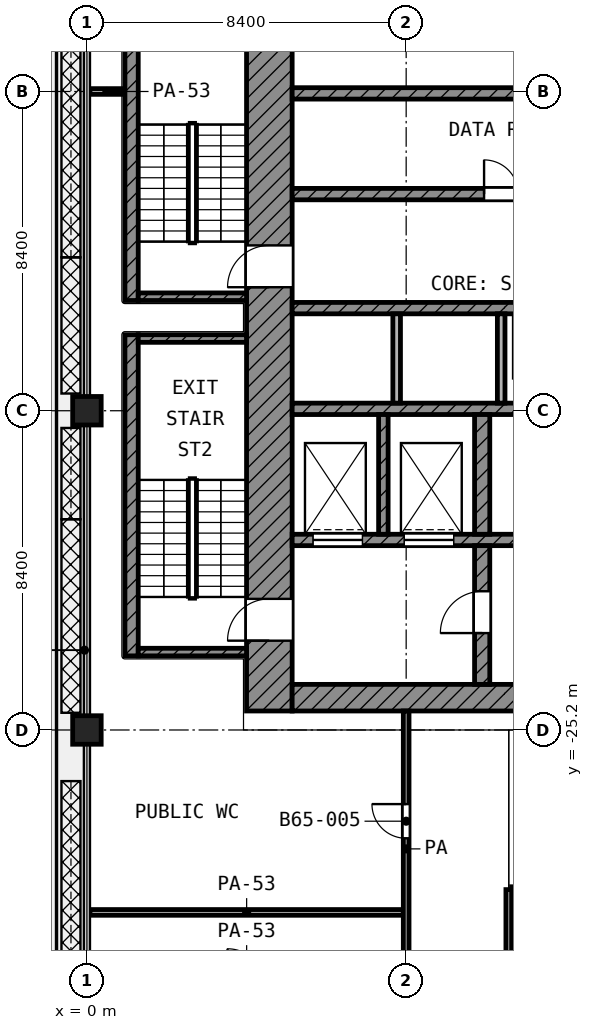
"""IFC4 building model, lengths in metres.
Left out: names, types, materials, properties, quantities, classifications, styles, units other than length and angle.
Written with IfcOpenShell. Run it as: python <this file> out.ifc"""

import sys

from ifc_helpers import new_model, si_unit, direction, frame, frame_2d, origin, origin_2d, place, context, subcontext, project, spatial, rectangle, extrude, element, fill, save


model = new_model("IFC4")
c1 = context("Model", 3, precision=1e-05, world=origin(), true_north=direction((0.0, 1.0)))
c2 = subcontext(c1, "Body", "Model", "MODEL_VIEW")
j1 = project(units=[si_unit("LENGTHUNIT", "METRE"), si_unit("PLANEANGLEUNIT", "RADIAN")], contexts=[c1])
p1 = place(None, origin())
s1 = spatial("IfcSite", under=j1, at=p1, CompositionType="ELEMENT")
p2 = place(p1, origin())
s2 = spatial("IfcBuilding", under=s1, at=p2, CompositionType="ELEMENT")
p3 = place(p2, frame((0.0, 0.0, 281.8)))
s3 = spatial("IfcBuildingStorey", under=s2, at=p3, CompositionType="ELEMENT", Elevation=281.8)
for number, where, z_axis, x_axis in (
    (1, (0.0, -16.8, 0.0), (0.0, 0.0, 1.0), (1.0, 0.0, 0.0)),
    (2, (0.0, -25.2, 0.0), (0.0, 0.0, 1.0), (1.0, 0.0, 0.0)),
):
    element("IfcColumn", number, at=place(p3, frame(where, z_axis=z_axis, x_axis=x_axis)), inside=s3, PredefinedType="COLUMN", context=c2, shape_type="SweptSolid", body=[
        extrude(rectangle(XDim=0.75, YDim=0.75, at=origin_2d()), origin(), (0.0, 0.0, 1.0), 4.2),
    ])
p4 = place(p3, frame((4.8, -24.7, 0.0), z_axis=(0.0, 0.0, 1.0), x_axis=(0.0, 1.0, 0.0)))
e3 = element("IfcWall", 3, at=p4, inside=s3, PredefinedType="SHEAR", context=c2, shape_type="SweptSolid", body=[
    extrude(rectangle(XDim=19.3, YDim=1.2, at=frame_2d((9.65, 0.0))), origin(), (0.0, 0.0, 1.0), 3.6),
])
p5 = place(p4, frame((11.15, 0.0, 0.0)))
e4 = element("IfcOpeningElement", 4, at=p5, cuts=e3, PredefinedType="OPENING", context=c2, shape_type="SweptSolid", body=[
    extrude(rectangle(XDim=1.1, YDim=2.1, at=frame_2d((0.55, 1.05))), frame((0.0, 0.61, 0.0), z_axis=(0.0, -1.0, 0.0), x_axis=(1.0, 0.0, 0.0)), (0.0, 0.0, 1.0), 1.22),
])
p6 = place(p4, frame((1.85, 0.0, 0.0)))
e5 = element("IfcOpeningElement", 5, at=p6, cuts=e3, PredefinedType="OPENING", context=c2, shape_type="SweptSolid", body=[
    extrude(rectangle(XDim=1.1, YDim=2.1, at=frame_2d((0.55, 1.05))), frame((0.0, 0.61, 0.0), z_axis=(0.0, -1.0, 0.0), x_axis=(1.0, 0.0, 0.0)), (0.0, 0.0, 1.0), 1.22),
])
p7 = place(p3, frame((5.4, -24.35, 0.0), z_axis=(0.0, 0.0, 1.0), x_axis=(1.0, 0.0, 0.0)))
e6 = element("IfcWall", 6, at=p7, inside=s3, PredefinedType="SHEAR", context=c2, shape_type="SweptSolid", body=[
    extrude(rectangle(XDim=18.6, YDim=0.7, at=frame_2d((9.3, 0.0))), origin(), (0.0, 0.0, 1.0), 3.6),
])
p8 = place(p7, frame((6.3, 0.0, 0.0)))
e7 = element("IfcOpeningElement", 7, at=p8, cuts=e6, PredefinedType="OPENING", context=c2, shape_type="SweptSolid", body=[
    extrude(rectangle(XDim=1.8, YDim=2.1, at=frame_2d((0.9, 1.05))), frame((0.0, 0.36, 0.0), z_axis=(0.0, -1.0, 0.0), x_axis=(1.0, 0.0, 0.0)), (0.0, 0.0, 1.0), 0.72),
])
p9 = place(p3, frame((5.4, -8.45, 0.0), z_axis=(0.0, 0.0, 1.0), x_axis=(1.0, 0.0, 0.0)))
e8 = element("IfcWall", 8, at=p9, inside=s3, PredefinedType="SHEAR", context=c2, shape_type="SweptSolid", body=[
    extrude(rectangle(XDim=16.65, YDim=0.3, at=frame_2d((8.325, 0.0))), origin(), (0.0, 0.0, 1.0), 3.6),
])
p10 = place(p3, frame((5.4, -11.1, 0.0), z_axis=(0.0, 0.0, 1.0), x_axis=(1.0, 0.0, 0.0)))
e9 = element("IfcWall", 9, at=p10, inside=s3, PredefinedType="SHEAR", context=c2, shape_type="SweptSolid", body=[
    extrude(rectangle(XDim=16.65, YDim=0.3, at=frame_2d((8.325, 0.0))), origin(), (0.0, 0.0, 1.0), 3.6),
])
p11 = place(p10, frame((5.05, 0.0, 0.0)))
e10 = element("IfcOpeningElement", 10, at=p11, cuts=e9, PredefinedType="OPENING", context=c2, shape_type="SweptSolid", body=[
    extrude(rectangle(XDim=0.9, YDim=2.1, at=frame_2d((0.45, 1.05))), frame((0.0, 0.16, 0.0), z_axis=(0.0, -1.0, 0.0), x_axis=(1.0, 0.0, 0.0)), (0.0, 0.0, 1.0), 0.32),
])
p12 = place(p3, frame((5.4, -14.1, 0.0), z_axis=(0.0, 0.0, 1.0), x_axis=(1.0, 0.0, 0.0)))
e11 = element("IfcWall", 11, at=p12, inside=s3, PredefinedType="SHEAR", context=c2, shape_type="SweptSolid", body=[
    extrude(rectangle(XDim=16.65, YDim=0.3, at=frame_2d((8.325, 0.0))), origin(), (0.0, 0.0, 1.0), 3.6),
])
p13 = place(p12, frame((6.325, 0.0, 0.0)))
e12 = element("IfcOpeningElement", 12, at=p13, cuts=e11, PredefinedType="OPENING", context=c2, shape_type="SweptSolid", body=[
    extrude(rectangle(XDim=1.1, YDim=2.1, at=frame_2d((0.55, 1.05))), frame((0.0, 0.16, 0.0), z_axis=(0.0, -1.0, 0.0), x_axis=(1.0, 0.0, 0.0)), (0.0, 0.0, 1.0), 0.32),
])
p14 = place(p12, frame((9.075, 0.0, 0.0)))
e13 = element("IfcOpeningElement", 13, at=p14, cuts=e11, PredefinedType="OPENING", context=c2, shape_type="SweptSolid", body=[
    extrude(rectangle(XDim=1.1, YDim=2.1, at=frame_2d((0.55, 1.05))), frame((0.0, 0.16, 0.0), z_axis=(0.0, -1.0, 0.0), x_axis=(1.0, 0.0, 0.0)), (0.0, 0.0, 1.0), 0.32),
])
p15 = place(p12, frame((11.825, 0.0, 0.0)))
e14 = element("IfcOpeningElement", 14, at=p15, cuts=e11, PredefinedType="OPENING", context=c2, shape_type="SweptSolid", body=[
    extrude(rectangle(XDim=1.1, YDim=2.1, at=frame_2d((0.55, 1.05))), frame((0.0, 0.16, 0.0), z_axis=(0.0, -1.0, 0.0), x_axis=(1.0, 0.0, 0.0)), (0.0, 0.0, 1.0), 0.32),
])
p16 = place(p12, frame((14.575, 0.0, 0.0)))
e15 = element("IfcOpeningElement", 15, at=p16, cuts=e11, PredefinedType="OPENING", context=c2, shape_type="SweptSolid", body=[
    extrude(rectangle(XDim=1.1, YDim=2.1, at=frame_2d((0.55, 1.05))), frame((0.0, 0.16, 0.0), z_axis=(0.0, -1.0, 0.0), x_axis=(1.0, 0.0, 0.0)), (0.0, 0.0, 1.0), 0.32),
])
p17 = place(p3, frame((5.4, -16.75, 0.0), z_axis=(0.0, 0.0, 1.0), x_axis=(1.0, 0.0, 0.0)))
e16 = element("IfcWall", 16, at=p17, inside=s3, PredefinedType="SHEAR", context=c2, shape_type="SweptSolid", body=[
    extrude(rectangle(XDim=16.65, YDim=0.3, at=frame_2d((8.325, 0.0))), origin(), (0.0, 0.0, 1.0), 3.6),
])
p18 = place(p3, frame((5.4, -20.2, 0.0), z_axis=(0.0, 0.0, 1.0), x_axis=(1.0, 0.0, 0.0)))
e17 = element("IfcWall", 17, at=p18, inside=s3, PredefinedType="SHEAR", context=c2, shape_type="SweptSolid", body=[
    extrude(rectangle(XDim=14.65, YDim=0.3, at=frame_2d((7.325, 0.0))), origin(), (0.0, 0.0, 1.0), 3.6),
])
p19 = place(p18, frame((10.55, 0.0, 0.0)))
e18 = element("IfcOpeningElement", 18, at=p19, cuts=e17, PredefinedType="OPENING", context=c2, shape_type="SweptSolid", body=[
    extrude(rectangle(XDim=1.3, YDim=2.1, at=frame_2d((0.65, 1.05))), frame((0.0, 0.16, 0.0), z_axis=(0.0, -1.0, 0.0), x_axis=(1.0, 0.0, 0.0)), (0.0, 0.0, 1.0), 0.32),
])
p20 = place(p18, frame((12.95, 0.0, 0.0)))
e19 = element("IfcOpeningElement", 19, at=p20, cuts=e17, PredefinedType="OPENING", context=c2, shape_type="SweptSolid", body=[
    extrude(rectangle(XDim=1.3, YDim=2.1, at=frame_2d((0.65, 1.05))), frame((0.0, 0.16, 0.0), z_axis=(0.0, -1.0, 0.0), x_axis=(1.0, 0.0, 0.0)), (0.0, 0.0, 1.0), 0.32),
])
p21 = place(p18, frame((0.55, 0.0, 0.0)))
e20 = element("IfcOpeningElement", 20, at=p21, cuts=e17, PredefinedType="OPENING", context=c2, shape_type="SweptSolid", body=[
    extrude(rectangle(XDim=1.3, YDim=2.1, at=frame_2d((0.65, 1.05))), frame((0.0, 0.16, 0.0), z_axis=(0.0, -1.0, 0.0), x_axis=(1.0, 0.0, 0.0)), (0.0, 0.0, 1.0), 0.32),
])
p22 = place(p18, frame((2.95, 0.0, 0.0)))
e21 = element("IfcOpeningElement", 21, at=p22, cuts=e17, PredefinedType="OPENING", context=c2, shape_type="SweptSolid", body=[
    extrude(rectangle(XDim=1.3, YDim=2.1, at=frame_2d((0.65, 1.05))), frame((0.0, 0.16, 0.0), z_axis=(0.0, -1.0, 0.0), x_axis=(1.0, 0.0, 0.0)), (0.0, 0.0, 1.0), 0.32),
])
p23 = place(p18, frame((5.95, 0.0, 0.0)))
e22 = element("IfcOpeningElement", 22, at=p23, cuts=e17, PredefinedType="OPENING", context=c2, shape_type="SweptSolid", body=[
    extrude(rectangle(XDim=0.9, YDim=2.1, at=frame_2d((0.45, 1.05))), frame((0.0, 0.16, 0.0), z_axis=(0.0, -1.0, 0.0), x_axis=(1.0, 0.0, 0.0)), (0.0, 0.0, 1.0), 0.32),
])
p24 = place(p18, frame((8.35, 0.0, 0.0)))
e23 = element("IfcOpeningElement", 23, at=p24, cuts=e17, PredefinedType="OPENING", context=c2, shape_type="SweptSolid", body=[
    extrude(rectangle(XDim=0.9, YDim=2.1, at=frame_2d((0.45, 1.05))), frame((0.0, 0.16, 0.0), z_axis=(0.0, -1.0, 0.0), x_axis=(1.0, 0.0, 0.0)), (0.0, 0.0, 1.0), 0.32),
])
p25 = place(p3, frame((10.4, -24.0, 0.0), z_axis=(0.0, 0.0, 1.0), x_axis=(0.0, 1.0, 0.0)))
e24 = element("IfcWall", 24, at=p25, inside=s3, PredefinedType="SHEAR", context=c2, shape_type="SweptSolid", body=[
    extrude(rectangle(XDim=3.65, YDim=0.4, at=frame_2d((1.825, 0.0))), origin(), (0.0, 0.0, 1.0), 3.6),
])
p26 = place(p25, frame((1.35, 0.0, 0.0)))
e25 = element("IfcOpeningElement", 25, at=p26, cuts=e24, PredefinedType="OPENING", context=c2, shape_type="SweptSolid", body=[
    extrude(rectangle(XDim=1.1, YDim=2.1, at=frame_2d((0.55, 1.05))), frame((0.0, 0.21, 0.0), z_axis=(0.0, -1.0, 0.0), x_axis=(1.0, 0.0, 0.0)), (0.0, 0.0, 1.0), 0.42),
])
p27 = place(p3, frame((10.4, -20.05, 0.0), z_axis=(0.0, 0.0, 1.0), x_axis=(0.0, 1.0, 0.0)))
e26 = element("IfcWall", 26, at=p27, inside=s3, PredefinedType="SHEAR", context=c2, shape_type="SweptSolid", body=[
    extrude(rectangle(XDim=3.15, YDim=0.4, at=frame_2d((1.575, 0.0))), origin(), (0.0, 0.0, 1.0), 3.6),
])
p28 = place(p3, frame((7.8, -20.05, 0.0), z_axis=(0.0, 0.0, 1.0), x_axis=(0.0, 1.0, 0.0)))
e27 = element("IfcWall", 27, at=p28, inside=s3, PredefinedType="SHEAR", context=c2, shape_type="SweptSolid", body=[
    extrude(rectangle(XDim=3.15, YDim=0.25, at=frame_2d((1.575, 0.0))), origin(), (0.0, 0.0, 1.0), 3.6),
])
for number, where, z_axis, x_axis in (
    (28, (8.15, -16.6, 0.0), (0.0, 0.0, 1.0), (0.0, 1.0, 0.0)),
    (29, (10.9, -16.6, 0.0), (0.0, 0.0, 1.0), (0.0, 1.0, 0.0)),
):
    element("IfcWall", number, at=place(p3, frame(where, z_axis=z_axis, x_axis=x_axis)), inside=s3, PredefinedType="PARTITIONING", context=c2, shape_type="SweptSolid", body=[
        extrude(rectangle(XDim=2.35, YDim=0.2, at=frame_2d((1.175, 0.0))), origin(), (0.0, 0.0, 1.0), 3.6),
    ])
p29 = place(p3, frame((1.175, -13.9, 0.0), z_axis=(0.0, 0.0, 1.0), x_axis=(0.0, 1.0, 0.0)))
e30 = element("IfcWall", 30, at=p29, inside=s3, PredefinedType="SHEAR", context=c2, shape_type="SweptSolid", body=[
    extrude(rectangle(XDim=8.45, YDim=0.35, at=frame_2d((4.225, 0.0))), origin(), (0.0, 0.0, 1.0), 3.6),
])
p30 = place(p3, frame((1.35, -13.8, 0.0), z_axis=(0.0, 0.0, 1.0), x_axis=(1.0, 0.0, 0.0)))
e31 = element("IfcWall", 31, at=p30, inside=s3, PredefinedType="SHEAR", context=c2, shape_type="SweptSolid", body=[
    extrude(rectangle(XDim=2.85, YDim=0.2, at=frame_2d((1.425, 0.0))), origin(), (0.0, 0.0, 1.0), 3.6),
])
p31 = place(p3, frame((1.175, -23.25, 0.0), z_axis=(0.0, 0.0, 1.0), x_axis=(0.0, 1.0, 0.0)))
e32 = element("IfcWall", 32, at=p31, inside=s3, PredefinedType="SHEAR", context=c2, shape_type="SweptSolid", body=[
    extrude(rectangle(XDim=8.45, YDim=0.35, at=frame_2d((4.225, 0.0))), origin(), (0.0, 0.0, 1.0), 3.6),
])
for number, where, z_axis, x_axis in (
    (33, (1.35, -14.9, 0.0), (0.0, 0.0, 1.0), (1.0, 0.0, 0.0)),
    (34, (1.35, -23.15, 0.0), (0.0, 0.0, 1.0), (1.0, 0.0, 0.0)),
):
    element("IfcWall", number, at=place(p3, frame(where, z_axis=z_axis, x_axis=x_axis)), inside=s3, PredefinedType="SHEAR", context=c2, shape_type="SweptSolid", body=[
        extrude(rectangle(XDim=2.85, YDim=0.2, at=frame_2d((1.425, 0.0))), origin(), (0.0, 0.0, 1.0), 3.6),
    ])
p32 = place(p3, frame((0.08, -30.0, 0.0), z_axis=(0.0, 0.0, 1.0), x_axis=(1.0, 0.0, 0.0)))
e35 = element("IfcWall", 35, at=p32, inside=s3, PredefinedType="PARTITIONING", context=c2, shape_type="SweptSolid", body=[
    extrude(rectangle(XDim=8.245, YDim=0.15, at=frame_2d((4.123, 0.0))), origin(), (0.0, 0.0, 1.0), 2.7),
])
p33 = place(p3, frame((11.175, -29.4, 0.0), z_axis=(0.0, 0.0, 1.0), x_axis=(1.0, 0.0, 0.0)))
e36 = element("IfcWall", 36, at=p33, inside=s3, PredefinedType="PARTITIONING", context=c2, shape_type="SweptSolid", body=[
    extrude(rectangle(XDim=18.15, YDim=0.15, at=frame_2d((9.075, 0.0))), origin(), (0.0, 0.0, 1.0), 3.6),
])
p34 = place(p3, frame((0.08, -8.4, 0.0), z_axis=(0.0, 0.0, 1.0), x_axis=(1.0, 0.0, 0.0)))
e37 = element("IfcWall", 37, at=p34, inside=s3, PredefinedType="PARTITIONING", context=c2, shape_type="SweptSolid", body=[
    extrude(rectangle(XDim=0.89, YDim=0.15, at=frame_2d((0.445, 0.0))), origin(), (0.0, 0.0, 1.0), 2.7),
])
p35 = place(p3, frame((8.4, -31.957, 0.0), z_axis=(0.0, 0.0, 1.0), x_axis=(0.0, 1.0, 0.0)))
e38 = element("IfcWall", 38, at=p35, inside=s3, PredefinedType="PARTITIONING", context=c2, shape_type="SweptSolid", body=[
    extrude(rectangle(XDim=7.257, YDim=0.15, at=frame_2d((3.628, 0.0))), origin(), (0.0, 0.0, 1.0), 3.6),
])
p36 = place(p35, frame((3.907, 0.0, 0.0)))
e39 = element("IfcOpeningElement", 39, at=p36, cuts=e38, PredefinedType="OPENING", context=c2, shape_type="SweptSolid", body=[
    extrude(rectangle(XDim=0.9, YDim=2.1, at=frame_2d((0.45, 1.05))), frame((0.0, 0.085, 0.0), z_axis=(0.0, -1.0, 0.0), x_axis=(1.0, 0.0, 0.0)), (0.0, 0.0, 1.0), 0.17),
])
p37 = place(p3, frame((11.1, -46.12, 0.0), z_axis=(0.0, 0.0, 1.0), x_axis=(0.0, 1.0, 0.0)))
e40 = element("IfcWall", 40, at=p37, inside=s3, PredefinedType="PARTITIONING", context=c2, shape_type="SweptSolid", body=[
    extrude(rectangle(XDim=16.72, YDim=0.15, at=frame_2d((8.36, 0.0))), origin(), (0.0, 0.0, 1.0), 3.6),
])
p38 = place(p37, frame((10.37, 0.0, 0.0)))
e41 = element("IfcOpeningElement", 41, at=p38, cuts=e40, PredefinedType="OPENING", context=c2, shape_type="SweptSolid", body=[
    extrude(rectangle(XDim=1.5, YDim=2.1, at=frame_2d((0.75, 1.05))), frame((0.0, 0.085, 0.0), z_axis=(0.0, -1.0, 0.0), x_axis=(1.0, 0.0, 0.0)), (0.0, 0.0, 1.0), 0.17),
])
p39 = place(p37, frame((4.77, 0.0, 0.0)))
e42 = element("IfcOpeningElement", 42, at=p39, cuts=e40, PredefinedType="OPENING", context=c2, shape_type="SweptSolid", body=[
    extrude(rectangle(XDim=1.5, YDim=2.1, at=frame_2d((0.75, 1.05))), frame((0.0, 0.085, 0.0), z_axis=(0.0, -1.0, 0.0), x_axis=(1.0, 0.0, 0.0)), (0.0, 0.0, 1.0), 0.17),
])
p40 = place(p21, origin())
e43 = element("IfcDoor", 43, at=p40, inside=s3, OperationType="DOUBLE_DOOR_SLIDING", PredefinedType="DOOR", context=c2, shape_type="SweptSolid", body=[
    extrude(rectangle(XDim=1.3, YDim=2.1, at=frame_2d((0.65, 1.05))), frame((0.0, 0.025, 0.0), z_axis=(0.0, -1.0, 0.0), x_axis=(1.0, 0.0, 0.0)), (0.0, 0.0, 1.0), 0.05),
])
fill(e20, e43)
p41 = place(p22, origin())
e44 = element("IfcDoor", 44, at=p41, inside=s3, OperationType="DOUBLE_DOOR_SLIDING", PredefinedType="DOOR", context=c2, shape_type="SweptSolid", body=[
    extrude(rectangle(XDim=1.3, YDim=2.1, at=frame_2d((0.65, 1.05))), frame((0.0, 0.025, 0.0), z_axis=(0.0, -1.0, 0.0), x_axis=(1.0, 0.0, 0.0)), (0.0, 0.0, 1.0), 0.05),
])
fill(e21, e44)
p42 = place(p5, origin())
e45 = element("IfcDoor", 45, at=p42, inside=s3, OperationType="SINGLE_SWING_LEFT", PredefinedType="DOOR", context=c2, shape_type="SweptSolid", body=[
    extrude(rectangle(XDim=1.1, YDim=2.1, at=frame_2d((0.55, 1.05))), frame((0.0, 0.025, 0.0), z_axis=(0.0, -1.0, 0.0), x_axis=(1.0, 0.0, 0.0)), (0.0, 0.0, 1.0), 0.05),
])
fill(e4, e45)
p43 = place(p6, origin())
e46 = element("IfcDoor", 46, at=p43, inside=s3, OperationType="SINGLE_SWING_LEFT", PredefinedType="DOOR", context=c2, shape_type="SweptSolid", body=[
    extrude(rectangle(XDim=1.1, YDim=2.1, at=frame_2d((0.55, 1.05))), frame((0.0, 0.025, 0.0), z_axis=(0.0, -1.0, 0.0), x_axis=(1.0, 0.0, 0.0)), (0.0, 0.0, 1.0), 0.05),
])
fill(e5, e46)
p44 = place(p26, origin())
e47 = element("IfcDoor", 47, at=p44, inside=s3, OperationType="SINGLE_SWING_LEFT", PredefinedType="DOOR", context=c2, shape_type="SweptSolid", body=[
    extrude(rectangle(XDim=1.1, YDim=2.1, at=frame_2d((0.55, 1.05))), frame((0.0, 0.025, 0.0), z_axis=(0.0, -1.0, 0.0), x_axis=(1.0, 0.0, 0.0)), (0.0, 0.0, 1.0), 0.05),
])
fill(e25, e47)
p45 = place(p11, origin())
e48 = element("IfcDoor", 48, at=p45, inside=s3, OperationType="SINGLE_SWING_LEFT", PredefinedType="DOOR", context=c2, shape_type="SweptSolid", body=[
    extrude(rectangle(XDim=0.9, YDim=2.1, at=frame_2d((0.45, 1.05))), frame((0.0, 0.025, 0.0), z_axis=(0.0, -1.0, 0.0), x_axis=(1.0, 0.0, 0.0)), (0.0, 0.0, 1.0), 0.05),
])
fill(e10, e48)
p46 = place(p36, origin())
e49 = element("IfcDoor", 49, at=p46, inside=s3, OperationType="SINGLE_SWING_RIGHT", PredefinedType="DOOR", context=c2, shape_type="SweptSolid", body=[
    extrude(rectangle(XDim=0.9, YDim=2.1, at=frame_2d((0.45, 1.05))), frame((0.0, 0.025, 0.0), z_axis=(0.0, -1.0, 0.0), x_axis=(1.0, 0.0, 0.0)), (0.0, 0.0, 1.0), 0.05),
])
fill(e39, e49)
save(model, sys.argv[1])
